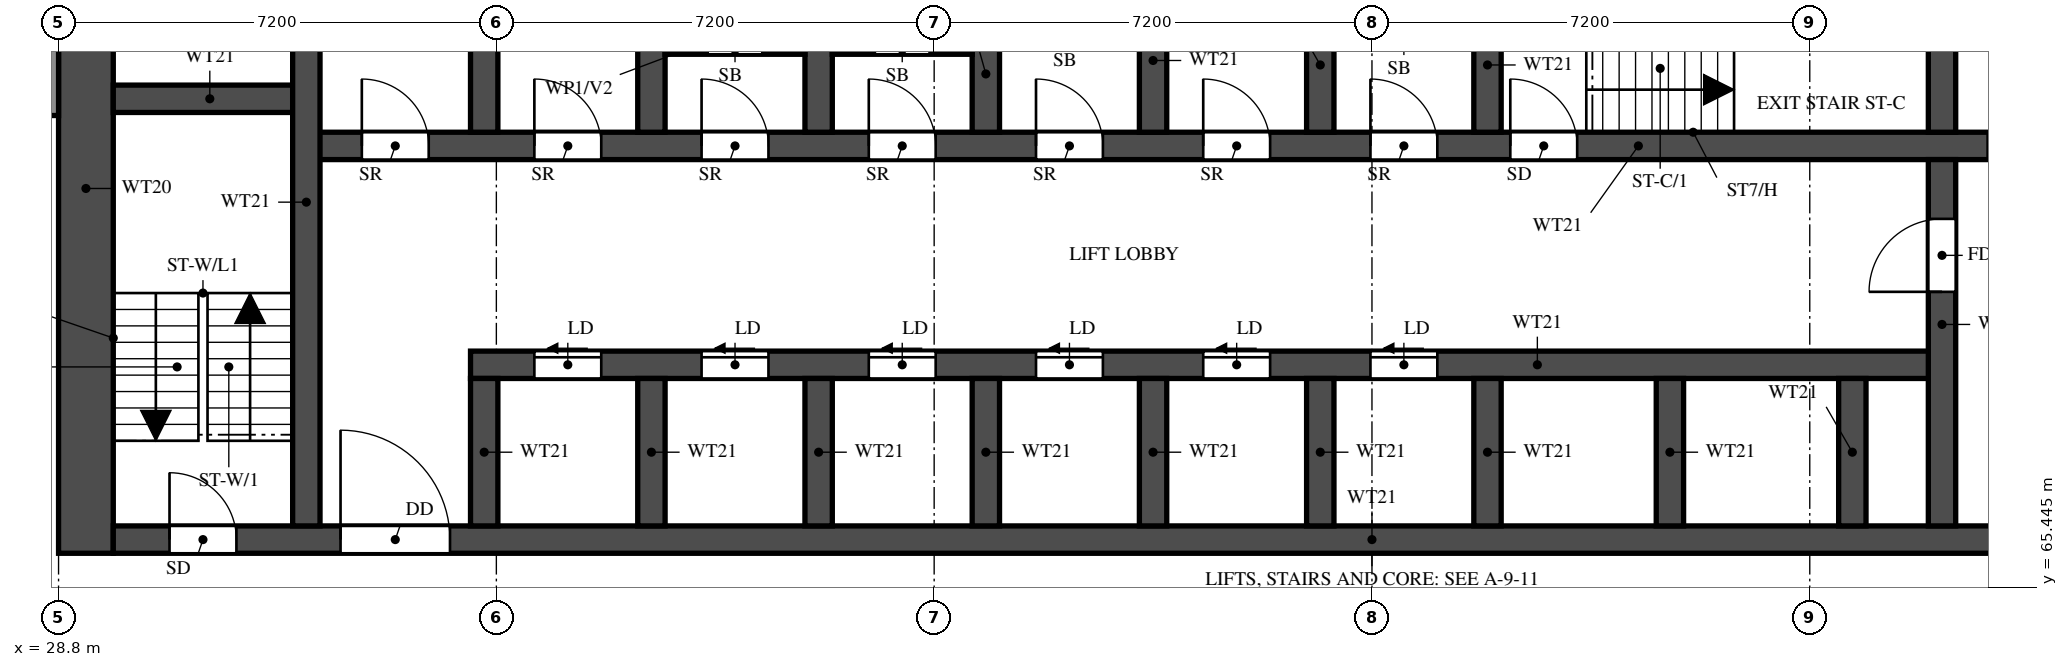
"""IFC4 building model, lengths in metres.
Left out: names, types, materials, properties, quantities, classifications, styles, units other than length and angle.
Written with IfcOpenShell. Run it as: python <this file> out.ifc"""

import sys

from ifc_helpers import new_model, si_unit, direction, frame, frame_2d, origin, place, context, subcontext, project, spatial, rectangle, extrude, element, fill, save


model = new_model("IFC4")
c1 = context("Model", 3, precision=1e-05, world=origin(), true_north=direction((0.0, 1.0)))
c2 = subcontext(c1, "Body", "Model", "MODEL_VIEW")
j1 = project(units=[si_unit("LENGTHUNIT", "METRE"), si_unit("PLANEANGLEUNIT", "RADIAN")], contexts=[c1])
p1 = place(None, origin())
s1 = spatial("IfcSite", under=j1, at=p1, CompositionType="ELEMENT")
p2 = place(p1, origin())
s2 = spatial("IfcBuilding", under=s1, at=p2, CompositionType="ELEMENT")
p3 = place(p2, frame((0.0, 0.0, 62.0)))
s3 = spatial("IfcBuildingStorey", under=s2, at=p3, CompositionType="ELEMENT", Elevation=62.0)
p4 = place(p3, frame((29.25, 66.0, 0.0), z_axis=(0.0, 0.0, 1.0), x_axis=(0.0, 1.0, 0.0)))
e1 = element("IfcWall", 1, at=p4, inside=s3, PredefinedType="SHEAR", context=c2, shape_type="SweptSolid", body=[
    extrude(rectangle(XDim=12.0, YDim=0.9, at=frame_2d((6.0, 0.0))), origin(), (0.0, 0.0, 1.0), 3.18),
])
p5 = place(p3, frame((29.7, 66.225, 0.0), z_axis=(0.0, 0.0, 1.0), x_axis=(1.0, 0.0, 0.0)))
e2 = element("IfcWall", 2, at=p5, inside=s3, PredefinedType="SHEAR", context=c2, shape_type="SweptSolid", body=[
    extrude(rectangle(XDim=41.4, YDim=0.45, at=frame_2d((20.7, 0.0))), origin(), (0.0, 0.0, 1.0), 3.18),
])
p6 = place(p5, frame((0.925, 0.0, 0.0)))
e3 = element("IfcOpeningElement", 3, at=p6, cuts=e2, PredefinedType="OPENING", context=c2, shape_type="SweptSolid", body=[
    extrude(rectangle(XDim=1.1, YDim=2.1, at=frame_2d((0.55, 1.05))), frame((0.0, 0.235, 0.0), z_axis=(0.0, -1.0, 0.0), x_axis=(1.0, 0.0, 0.0)), (0.0, 0.0, 1.0), 0.47),
])
p7 = place(p5, frame((3.738, 0.0, 0.0)))
e4 = element("IfcOpeningElement", 4, at=p7, cuts=e2, PredefinedType="OPENING", context=c2, shape_type="SweptSolid", body=[
    extrude(rectangle(XDim=1.8, YDim=2.1, at=frame_2d((0.9, 1.05))), frame((0.0, 0.235, 0.0), z_axis=(0.0, -1.0, 0.0), x_axis=(1.0, 0.0, 0.0)), (0.0, 0.0, 1.0), 0.47),
])
p8 = place(p3, frame((35.575, 69.1, 0.0), z_axis=(0.0, 0.0, 1.0), x_axis=(1.0, 0.0, 0.0)))
e5 = element("IfcWall", 5, at=p8, inside=s3, PredefinedType="SHEAR", context=c2, shape_type="SweptSolid", body=[
    extrude(rectangle(XDim=24.2, YDim=0.45, at=frame_2d((12.1, 0.0))), origin(), (0.0, 0.0, 1.0), 3.18),
])
p9 = place(p8, frame((1.05, 0.0, 0.0)))
e6 = element("IfcOpeningElement", 6, at=p9, cuts=e5, PredefinedType="OPENING", context=c2, shape_type="SweptSolid", body=[
    extrude(rectangle(XDim=1.1, YDim=2.1, at=frame_2d((0.55, 1.05))), frame((0.0, 0.235, 0.0), z_axis=(0.0, -1.0, 0.0), x_axis=(1.0, 0.0, 0.0)), (0.0, 0.0, 1.0), 0.47),
])
p10 = place(p8, frame((3.8, 0.0, 0.0)))
e7 = element("IfcOpeningElement", 7, at=p10, cuts=e5, PredefinedType="OPENING", context=c2, shape_type="SweptSolid", body=[
    extrude(rectangle(XDim=1.1, YDim=2.1, at=frame_2d((0.55, 1.05))), frame((0.0, 0.235, 0.0), z_axis=(0.0, -1.0, 0.0), x_axis=(1.0, 0.0, 0.0)), (0.0, 0.0, 1.0), 0.47),
])
p11 = place(p8, frame((6.55, 0.0, 0.0)))
e8 = element("IfcOpeningElement", 8, at=p11, cuts=e5, PredefinedType="OPENING", context=c2, shape_type="SweptSolid", body=[
    extrude(rectangle(XDim=1.1, YDim=2.1, at=frame_2d((0.55, 1.05))), frame((0.0, 0.235, 0.0), z_axis=(0.0, -1.0, 0.0), x_axis=(1.0, 0.0, 0.0)), (0.0, 0.0, 1.0), 0.47),
])
p12 = place(p8, frame((9.3, 0.0, 0.0)))
e9 = element("IfcOpeningElement", 9, at=p12, cuts=e5, PredefinedType="OPENING", context=c2, shape_type="SweptSolid", body=[
    extrude(rectangle(XDim=1.1, YDim=2.1, at=frame_2d((0.55, 1.05))), frame((0.0, 0.235, 0.0), z_axis=(0.0, -1.0, 0.0), x_axis=(1.0, 0.0, 0.0)), (0.0, 0.0, 1.0), 0.47),
])
p13 = place(p8, frame((12.05, 0.0, 0.0)))
e10 = element("IfcOpeningElement", 10, at=p13, cuts=e5, PredefinedType="OPENING", context=c2, shape_type="SweptSolid", body=[
    extrude(rectangle(XDim=1.1, YDim=2.1, at=frame_2d((0.55, 1.05))), frame((0.0, 0.235, 0.0), z_axis=(0.0, -1.0, 0.0), x_axis=(1.0, 0.0, 0.0)), (0.0, 0.0, 1.0), 0.47),
])
p14 = place(p8, frame((14.8, 0.0, 0.0)))
e11 = element("IfcOpeningElement", 11, at=p14, cuts=e5, PredefinedType="OPENING", context=c2, shape_type="SweptSolid", body=[
    extrude(rectangle(XDim=1.1, YDim=2.1, at=frame_2d((0.55, 1.05))), frame((0.0, 0.235, 0.0), z_axis=(0.0, -1.0, 0.0), x_axis=(1.0, 0.0, 0.0)), (0.0, 0.0, 1.0), 0.47),
])
p15 = place(p3, frame((32.875, 72.7, 0.0), z_axis=(0.0, 0.0, 1.0), x_axis=(1.0, 0.0, 0.0)))
e12 = element("IfcWall", 12, at=p15, inside=s3, PredefinedType="SHEAR", context=c2, shape_type="SweptSolid", body=[
    extrude(rectangle(XDim=35.05, YDim=0.45, at=frame_2d((17.525, 0.0))), origin(), (0.0, 0.0, 1.0), 3.18),
])
p16 = place(p15, frame((19.8, 0.0, 0.0)))
e13 = element("IfcOpeningElement", 13, at=p16, cuts=e12, PredefinedType="OPENING", context=c2, shape_type="SweptSolid", body=[
    extrude(rectangle(XDim=1.1, YDim=2.1, at=frame_2d((0.55, 1.05))), frame((0.0, 0.235, 0.0), z_axis=(0.0, -1.0, 0.0), x_axis=(1.0, 0.0, 0.0)), (0.0, 0.0, 1.0), 0.47),
])
p17 = place(p15, frame((27.65, 0.0, 0.0)))
e14 = element("IfcOpeningElement", 14, at=p17, cuts=e12, PredefinedType="OPENING", context=c2, shape_type="SweptSolid", body=[
    extrude(rectangle(XDim=1.1, YDim=2.1, at=frame_2d((0.55, 1.05))), frame((0.0, 0.235, 0.0), z_axis=(0.0, -1.0, 0.0), x_axis=(1.0, 0.0, 0.0)), (0.0, 0.0, 1.0), 0.47),
])
p18 = place(p15, frame((30.25, 0.0, 0.0)))
e15 = element("IfcOpeningElement", 15, at=p18, cuts=e12, PredefinedType="OPENING", context=c2, shape_type="SweptSolid", body=[
    extrude(rectangle(XDim=1.1, YDim=2.1, at=frame_2d((0.55, 1.05))), frame((0.0, 0.235, 0.0), z_axis=(0.0, -1.0, 0.0), x_axis=(1.0, 0.0, 0.0)), (0.0, 0.0, 1.0), 0.47),
])
p19 = place(p15, frame((3.75, 0.0, 0.0)))
e16 = element("IfcOpeningElement", 16, at=p19, cuts=e12, PredefinedType="OPENING", context=c2, shape_type="SweptSolid", body=[
    extrude(rectangle(XDim=1.1, YDim=2.1, at=frame_2d((0.55, 1.05))), frame((0.0, 0.235, 0.0), z_axis=(0.0, -1.0, 0.0), x_axis=(1.0, 0.0, 0.0)), (0.0, 0.0, 1.0), 0.47),
])
p20 = place(p15, frame((6.5, 0.0, 0.0)))
e17 = element("IfcOpeningElement", 17, at=p20, cuts=e12, PredefinedType="OPENING", context=c2, shape_type="SweptSolid", body=[
    extrude(rectangle(XDim=1.1, YDim=2.1, at=frame_2d((0.55, 1.05))), frame((0.0, 0.235, 0.0), z_axis=(0.0, -1.0, 0.0), x_axis=(1.0, 0.0, 0.0)), (0.0, 0.0, 1.0), 0.47),
])
p21 = place(p15, frame((9.25, 0.0, 0.0)))
e18 = element("IfcOpeningElement", 18, at=p21, cuts=e12, PredefinedType="OPENING", context=c2, shape_type="SweptSolid", body=[
    extrude(rectangle(XDim=1.1, YDim=2.1, at=frame_2d((0.55, 1.05))), frame((0.0, 0.235, 0.0), z_axis=(0.0, -1.0, 0.0), x_axis=(1.0, 0.0, 0.0)), (0.0, 0.0, 1.0), 0.47),
])
p22 = place(p15, frame((12.0, 0.0, 0.0)))
e19 = element("IfcOpeningElement", 19, at=p22, cuts=e12, PredefinedType="OPENING", context=c2, shape_type="SweptSolid", body=[
    extrude(rectangle(XDim=1.1, YDim=2.1, at=frame_2d((0.55, 1.05))), frame((0.0, 0.235, 0.0), z_axis=(0.0, -1.0, 0.0), x_axis=(1.0, 0.0, 0.0)), (0.0, 0.0, 1.0), 0.47),
])
p23 = place(p15, frame((14.75, 0.0, 0.0)))
e20 = element("IfcOpeningElement", 20, at=p23, cuts=e12, PredefinedType="OPENING", context=c2, shape_type="SweptSolid", body=[
    extrude(rectangle(XDim=1.1, YDim=2.1, at=frame_2d((0.55, 1.05))), frame((0.0, 0.235, 0.0), z_axis=(0.0, -1.0, 0.0), x_axis=(1.0, 0.0, 0.0)), (0.0, 0.0, 1.0), 0.47),
])
p24 = place(p15, frame((17.5, 0.0, 0.0)))
e21 = element("IfcOpeningElement", 21, at=p24, cuts=e12, PredefinedType="OPENING", context=c2, shape_type="SweptSolid", body=[
    extrude(rectangle(XDim=1.1, YDim=2.1, at=frame_2d((0.55, 1.05))), frame((0.0, 0.235, 0.0), z_axis=(0.0, -1.0, 0.0), x_axis=(1.0, 0.0, 0.0)), (0.0, 0.0, 1.0), 0.47),
])
p25 = place(p15, frame((0.913, 0.0, 0.0)))
e22 = element("IfcOpeningElement", 22, at=p25, cuts=e12, PredefinedType="OPENING", context=c2, shape_type="SweptSolid", body=[
    extrude(rectangle(XDim=1.1, YDim=2.1, at=frame_2d((0.55, 1.05))), frame((0.0, 0.235, 0.0), z_axis=(0.0, -1.0, 0.0), x_axis=(1.0, 0.0, 0.0)), (0.0, 0.0, 1.0), 0.47),
])
p26 = place(p3, frame((29.7, 73.475, 0.0), z_axis=(0.0, 0.0, 1.0), x_axis=(1.0, 0.0, 0.0)))
e23 = element("IfcWall", 23, at=p26, inside=s3, PredefinedType="SHEAR", context=c2, shape_type="SweptSolid", body=[
    extrude(rectangle(XDim=3.175, YDim=0.45, at=frame_2d((1.587, 0.0))), origin(), (0.0, 0.0, 1.0), 3.18),
])
p27 = place(p3, frame((32.875, 66.45, 0.0), z_axis=(0.0, 0.0, 1.0), x_axis=(0.0, 1.0, 0.0)))
e24 = element("IfcWall", 24, at=p27, inside=s3, PredefinedType="SHEAR", context=c2, shape_type="SweptSolid", body=[
    extrude(rectangle(XDim=10.65, YDim=0.45, at=frame_2d((5.325, 0.0))), origin(), (0.0, 0.0, 1.0), 3.18),
])
p28 = place(p3, frame((59.775, 66.45, 0.0), z_axis=(0.0, 0.0, 1.0), x_axis=(0.0, 1.0, 0.0)))
e25 = element("IfcWall", 25, at=p28, inside=s3, PredefinedType="SHEAR", context=c2, shape_type="SweptSolid", body=[
    extrude(rectangle(XDim=6.025, YDim=0.45, at=frame_2d((3.013, 0.0))), origin(), (0.0, 0.0, 1.0), 3.18),
])
p29 = place(p28, frame((3.85, 0.0, 0.0)))
e26 = element("IfcOpeningElement", 26, at=p29, cuts=e25, PredefinedType="OPENING", context=c2, shape_type="SweptSolid", body=[
    extrude(rectangle(XDim=1.2, YDim=2.1, at=frame_2d((0.6, 1.05))), frame((0.0, 0.235, 0.0), z_axis=(0.0, -1.0, 0.0), x_axis=(1.0, 0.0, 0.0)), (0.0, 0.0, 1.0), 0.47),
])
p30 = place(p3, frame((59.775, 72.925, 0.0), z_axis=(0.0, 0.0, 1.0), x_axis=(0.0, 1.0, 0.0)))
e27 = element("IfcWall", 27, at=p30, inside=s3, PredefinedType="SHEAR", context=c2, shape_type="SweptSolid", body=[
    extrude(rectangle(XDim=2.95, YDim=0.45, at=frame_2d((1.475, 0.0))), origin(), (0.0, 0.0, 1.0), 3.18),
])
for number, where, z_axis, x_axis in (
    (28, (35.8, 66.45, 0.0), (0.0, 0.0, 1.0), (0.0, 1.0, 0.0)),
    (29, (38.55, 66.45, 0.0), (0.0, 0.0, 1.0), (0.0, 1.0, 0.0)),
    (30, (41.3, 66.45, 0.0), (0.0, 0.0, 1.0), (0.0, 1.0, 0.0)),
    (31, (44.05, 66.45, 0.0), (0.0, 0.0, 1.0), (0.0, 1.0, 0.0)),
    (32, (46.8, 66.45, 0.0), (0.0, 0.0, 1.0), (0.0, 1.0, 0.0)),
    (33, (49.55, 66.45, 0.0), (0.0, 0.0, 1.0), (0.0, 1.0, 0.0)),
    (34, (52.3, 66.45, 0.0), (0.0, 0.0, 1.0), (0.0, 1.0, 0.0)),
    (35, (55.3, 66.45, 0.0), (0.0, 0.0, 1.0), (0.0, 1.0, 0.0)),
    (36, (58.3, 66.45, 0.0), (0.0, 0.0, 1.0), (0.0, 1.0, 0.0)),
):
    element("IfcWall", number, at=place(p3, frame(where, z_axis=z_axis, x_axis=x_axis)), inside=s3, PredefinedType="SHEAR", context=c2, shape_type="SweptSolid", body=[
        extrude(rectangle(XDim=2.425, YDim=0.45, at=frame_2d((1.212, 0.0))), origin(), (0.0, 0.0, 1.0), 3.18),
    ])
for number, where, z_axis, x_axis in (
    (37, (35.8, 72.925, 0.0), (0.0, 0.0, 1.0), (0.0, 1.0, 0.0)),
    (38, (38.55, 72.925, 0.0), (0.0, 0.0, 1.0), (0.0, 1.0, 0.0)),
    (39, (41.3, 72.925, 0.0), (0.0, 0.0, 1.0), (0.0, 1.0, 0.0)),
    (40, (44.05, 72.925, 0.0), (0.0, 0.0, 1.0), (0.0, 1.0, 0.0)),
    (41, (46.8, 72.925, 0.0), (0.0, 0.0, 1.0), (0.0, 1.0, 0.0)),
    (42, (49.55, 72.925, 0.0), (0.0, 0.0, 1.0), (0.0, 1.0, 0.0)),
    (43, (52.3, 72.925, 0.0), (0.0, 0.0, 1.0), (0.0, 1.0, 0.0)),
):
    element("IfcWall", number, at=place(p3, frame(where, z_axis=z_axis, x_axis=x_axis)), inside=s3, PredefinedType="SHEAR", context=c2, shape_type="SweptSolid", body=[
        extrude(rectangle(XDim=2.95, YDim=0.45, at=frame_2d((1.475, 0.0))), origin(), (0.0, 0.0, 1.0), 3.18),
    ])
p31 = place(p3, frame((38.775, 74.282, 0.0), z_axis=(0.0, 0.0, 1.0), x_axis=(1.0, 0.0, 0.0)))
e44 = element("IfcWall", 44, at=p31, inside=s3, PredefinedType="PARTITIONING", context=c2, shape_type="SweptSolid", body=[
    extrude(rectangle(XDim=2.3, YDim=0.15, at=frame_2d((1.15, 0.0))), origin(), (0.0, 0.0, 1.0), 3.18),
])
p32 = place(p31, frame((0.7, 0.0, 0.0)))
e45 = element("IfcOpeningElement", 45, at=p32, cuts=e44, PredefinedType="OPENING", context=c2, shape_type="SweptSolid", body=[
    extrude(rectangle(XDim=0.9, YDim=2.1, at=frame_2d((0.45, 1.05))), frame((0.0, 0.085, 0.0), z_axis=(0.0, -1.0, 0.0), x_axis=(1.0, 0.0, 0.0)), (0.0, 0.0, 1.0), 0.17),
])
p33 = place(p3, frame((41.525, 74.282, 0.0), z_axis=(0.0, 0.0, 1.0), x_axis=(1.0, 0.0, 0.0)))
e46 = element("IfcWall", 46, at=p33, inside=s3, PredefinedType="PARTITIONING", context=c2, shape_type="SweptSolid", body=[
    extrude(rectangle(XDim=2.3, YDim=0.15, at=frame_2d((1.15, 0.0))), origin(), (0.0, 0.0, 1.0), 3.18),
])
p34 = place(p33, frame((0.7, 0.0, 0.0)))
e47 = element("IfcOpeningElement", 47, at=p34, cuts=e46, PredefinedType="OPENING", context=c2, shape_type="SweptSolid", body=[
    extrude(rectangle(XDim=0.9, YDim=2.1, at=frame_2d((0.45, 1.05))), frame((0.0, 0.085, 0.0), z_axis=(0.0, -1.0, 0.0), x_axis=(1.0, 0.0, 0.0)), (0.0, 0.0, 1.0), 0.17),
])
p35 = place(p3, frame((28.7, 73.2, 0.0), z_axis=(0.0, 0.0, 1.0), x_axis=(0.0, 1.0, 0.0)))
e48 = element("IfcWall", 48, at=p35, inside=s3, PredefinedType="SOLIDWALL", context=c2, shape_type="SweptSolid", body=[
    extrude(rectangle(XDim=4.8, YDim=0.2, at=frame_2d((2.4, 0.0))), origin(), (0.0, 0.0, 1.0), 3.18),
])
p36 = place(p6, origin())
e49 = element("IfcDoor", 49, at=p36, inside=s3, OperationType="SINGLE_SWING_LEFT", PredefinedType="DOOR", context=c2, shape_type="SweptSolid", body=[
    extrude(rectangle(XDim=1.1, YDim=2.1, at=frame_2d((0.55, 1.05))), frame((0.0, 0.025, 0.0), z_axis=(0.0, -1.0, 0.0), x_axis=(1.0, 0.0, 0.0)), (0.0, 0.0, 1.0), 0.05),
])
fill(e3, e49)
p37 = place(p16, origin())
e50 = element("IfcDoor", 50, at=p37, inside=s3, OperationType="SINGLE_SWING_LEFT", PredefinedType="DOOR", context=c2, shape_type="SweptSolid", body=[
    extrude(rectangle(XDim=1.1, YDim=2.1, at=frame_2d((0.55, 1.05))), frame((0.0, 0.025, 0.0), z_axis=(0.0, -1.0, 0.0), x_axis=(1.0, 0.0, 0.0)), (0.0, 0.0, 1.0), 0.05),
])
fill(e13, e50)
p38 = place(p7, origin())
e51 = element("IfcDoor", 51, at=p38, inside=s3, OperationType="DOUBLE_DOOR_SINGLE_SWING", PredefinedType="DOOR", context=c2, shape_type="SweptSolid", body=[
    extrude(rectangle(XDim=1.8, YDim=2.1, at=frame_2d((0.9, 1.05))), frame((0.0, 0.025, 0.0), z_axis=(0.0, -1.0, 0.0), x_axis=(1.0, 0.0, 0.0)), (0.0, 0.0, 1.0), 0.05),
])
fill(e4, e51)
p39 = place(p29, origin())
e52 = element("IfcDoor", 52, at=p39, inside=s3, OperationType="SINGLE_SWING_RIGHT", PredefinedType="DOOR", context=c2, shape_type="SweptSolid", body=[
    extrude(rectangle(XDim=1.2, YDim=2.1, at=frame_2d((0.6, 1.05))), frame((0.0, 0.025, 0.0), z_axis=(0.0, -1.0, 0.0), x_axis=(1.0, 0.0, 0.0)), (0.0, 0.0, 1.0), 0.05),
])
fill(e26, e52)
p40 = place(p17, origin())
e53 = element("IfcDoor", 53, at=p40, inside=s3, OperationType="SLIDING_TO_LEFT", PredefinedType="DOOR", context=c2, shape_type="SweptSolid", body=[
    extrude(rectangle(XDim=1.1, YDim=2.1, at=frame_2d((0.55, 1.05))), frame((0.0, 0.025, 0.0), z_axis=(0.0, -1.0, 0.0), x_axis=(1.0, 0.0, 0.0)), (0.0, 0.0, 1.0), 0.05),
])
fill(e14, e53)
p41 = place(p9, origin())
e54 = element("IfcDoor", 54, at=p41, inside=s3, OperationType="SLIDING_TO_LEFT", PredefinedType="DOOR", context=c2, shape_type="SweptSolid", body=[
    extrude(rectangle(XDim=1.1, YDim=2.1, at=frame_2d((0.55, 1.05))), frame((0.0, 0.025, 0.0), z_axis=(0.0, -1.0, 0.0), x_axis=(1.0, 0.0, 0.0)), (0.0, 0.0, 1.0), 0.05),
])
fill(e6, e54)
p42 = place(p10, origin())
e55 = element("IfcDoor", 55, at=p42, inside=s3, OperationType="SLIDING_TO_LEFT", PredefinedType="DOOR", context=c2, shape_type="SweptSolid", body=[
    extrude(rectangle(XDim=1.1, YDim=2.1, at=frame_2d((0.55, 1.05))), frame((0.0, 0.025, 0.0), z_axis=(0.0, -1.0, 0.0), x_axis=(1.0, 0.0, 0.0)), (0.0, 0.0, 1.0), 0.05),
])
fill(e7, e55)
p43 = place(p11, origin())
e56 = element("IfcDoor", 56, at=p43, inside=s3, OperationType="SLIDING_TO_LEFT", PredefinedType="DOOR", context=c2, shape_type="SweptSolid", body=[
    extrude(rectangle(XDim=1.1, YDim=2.1, at=frame_2d((0.55, 1.05))), frame((0.0, 0.025, 0.0), z_axis=(0.0, -1.0, 0.0), x_axis=(1.0, 0.0, 0.0)), (0.0, 0.0, 1.0), 0.05),
])
fill(e8, e56)
p44 = place(p12, origin())
e57 = element("IfcDoor", 57, at=p44, inside=s3, OperationType="SLIDING_TO_LEFT", PredefinedType="DOOR", context=c2, shape_type="SweptSolid", body=[
    extrude(rectangle(XDim=1.1, YDim=2.1, at=frame_2d((0.55, 1.05))), frame((0.0, 0.025, 0.0), z_axis=(0.0, -1.0, 0.0), x_axis=(1.0, 0.0, 0.0)), (0.0, 0.0, 1.0), 0.05),
])
fill(e9, e57)
p45 = place(p13, origin())
e58 = element("IfcDoor", 58, at=p45, inside=s3, OperationType="SLIDING_TO_LEFT", PredefinedType="DOOR", context=c2, shape_type="SweptSolid", body=[
    extrude(rectangle(XDim=1.1, YDim=2.1, at=frame_2d((0.55, 1.05))), frame((0.0, 0.025, 0.0), z_axis=(0.0, -1.0, 0.0), x_axis=(1.0, 0.0, 0.0)), (0.0, 0.0, 1.0), 0.05),
])
fill(e10, e58)
p46 = place(p14, origin())
e59 = element("IfcDoor", 59, at=p46, inside=s3, OperationType="SLIDING_TO_LEFT", PredefinedType="DOOR", context=c2, shape_type="SweptSolid", body=[
    extrude(rectangle(XDim=1.1, YDim=2.1, at=frame_2d((0.55, 1.05))), frame((0.0, 0.025, 0.0), z_axis=(0.0, -1.0, 0.0), x_axis=(1.0, 0.0, 0.0)), (0.0, 0.0, 1.0), 0.05),
])
fill(e11, e59)
p47 = place(p19, origin())
e60 = element("IfcDoor", 60, at=p47, inside=s3, OperationType="SINGLE_SWING_LEFT", PredefinedType="DOOR", context=c2, shape_type="SweptSolid", body=[
    extrude(rectangle(XDim=1.1, YDim=2.1, at=frame_2d((0.55, 1.05))), frame((0.0, 0.025, 0.0), z_axis=(0.0, -1.0, 0.0), x_axis=(1.0, 0.0, 0.0)), (0.0, 0.0, 1.0), 0.05),
])
fill(e16, e60)
p48 = place(p20, origin())
e61 = element("IfcDoor", 61, at=p48, inside=s3, OperationType="SINGLE_SWING_LEFT", PredefinedType="DOOR", context=c2, shape_type="SweptSolid", body=[
    extrude(rectangle(XDim=1.1, YDim=2.1, at=frame_2d((0.55, 1.05))), frame((0.0, 0.025, 0.0), z_axis=(0.0, -1.0, 0.0), x_axis=(1.0, 0.0, 0.0)), (0.0, 0.0, 1.0), 0.05),
])
fill(e17, e61)
p49 = place(p21, origin())
e62 = element("IfcDoor", 62, at=p49, inside=s3, OperationType="SINGLE_SWING_LEFT", PredefinedType="DOOR", context=c2, shape_type="SweptSolid", body=[
    extrude(rectangle(XDim=1.1, YDim=2.1, at=frame_2d((0.55, 1.05))), frame((0.0, 0.025, 0.0), z_axis=(0.0, -1.0, 0.0), x_axis=(1.0, 0.0, 0.0)), (0.0, 0.0, 1.0), 0.05),
])
fill(e18, e62)
p50 = place(p22, origin())
e63 = element("IfcDoor", 63, at=p50, inside=s3, OperationType="SINGLE_SWING_LEFT", PredefinedType="DOOR", context=c2, shape_type="SweptSolid", body=[
    extrude(rectangle(XDim=1.1, YDim=2.1, at=frame_2d((0.55, 1.05))), frame((0.0, 0.025, 0.0), z_axis=(0.0, -1.0, 0.0), x_axis=(1.0, 0.0, 0.0)), (0.0, 0.0, 1.0), 0.05),
])
fill(e19, e63)
p51 = place(p23, origin())
e64 = element("IfcDoor", 64, at=p51, inside=s3, OperationType="SINGLE_SWING_LEFT", PredefinedType="DOOR", context=c2, shape_type="SweptSolid", body=[
    extrude(rectangle(XDim=1.1, YDim=2.1, at=frame_2d((0.55, 1.05))), frame((0.0, 0.025, 0.0), z_axis=(0.0, -1.0, 0.0), x_axis=(1.0, 0.0, 0.0)), (0.0, 0.0, 1.0), 0.05),
])
fill(e20, e64)
p52 = place(p24, origin())
e65 = element("IfcDoor", 65, at=p52, inside=s3, OperationType="SINGLE_SWING_LEFT", PredefinedType="DOOR", context=c2, shape_type="SweptSolid", body=[
    extrude(rectangle(XDim=1.1, YDim=2.1, at=frame_2d((0.55, 1.05))), frame((0.0, 0.025, 0.0), z_axis=(0.0, -1.0, 0.0), x_axis=(1.0, 0.0, 0.0)), (0.0, 0.0, 1.0), 0.05),
])
fill(e21, e65)
p53 = place(p25, origin())
e66 = element("IfcDoor", 66, at=p53, inside=s3, OperationType="SINGLE_SWING_LEFT", PredefinedType="DOOR", context=c2, shape_type="SweptSolid", body=[
    extrude(rectangle(XDim=1.1, YDim=2.1, at=frame_2d((0.55, 1.05))), frame((0.0, 0.025, 0.0), z_axis=(0.0, -1.0, 0.0), x_axis=(1.0, 0.0, 0.0)), (0.0, 0.0, 1.0), 0.05),
])
fill(e22, e66)
save(model, sys.argv[1])
